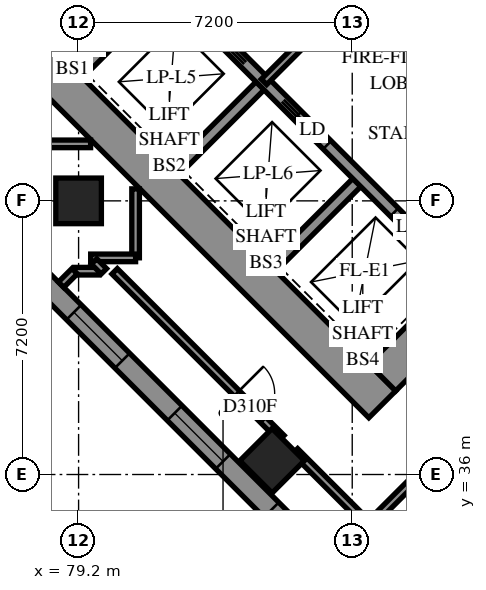
"""IFC4 building model, lengths in metres.
Left out: names, types, materials, properties, quantities, classifications, styles, units other than length and angle.
Written with IfcOpenShell. Run it as: python <this file> out.ifc"""

import sys

from ifc_helpers import new_model, si_unit, direction, frame, frame_2d, origin, origin_2d, place, context, subcontext, project, spatial, polyline, rectangle, outline, extrude, element, fill, save


model = new_model("IFC4")
c1 = context("Model", 3, precision=1e-05, world=origin(), true_north=direction((0.0, 1.0)))
c2 = subcontext(c1, "Body", "Model", "MODEL_VIEW")
j1 = project(units=[si_unit("LENGTHUNIT", "METRE"), si_unit("PLANEANGLEUNIT", "RADIAN")], contexts=[c1])
p1 = place(None, origin())
s1 = spatial("IfcSite", under=j1, at=p1, CompositionType="ELEMENT")
p2 = place(p1, origin())
s2 = spatial("IfcBuilding", under=s1, at=p2, CompositionType="ELEMENT")
p3 = place(p2, frame((0.0, 0.0, 22.8)))
s3 = spatial("IfcBuildingStorey", under=s2, at=p3, CompositionType="ELEMENT", Elevation=22.8)
for number, where, z_axis, x_axis in (
    (1, (79.2, 43.2, 0.0), (0.0, 0.0, 1.0), (1.0, 0.0, 0.0)),
    (2, (84.291, 36.362, 0.0), (0.0, 0.0, 1.0), (0.707, -0.707, 0.0)),
):
    element("IfcColumn", number, at=place(p3, frame(where, z_axis=z_axis, x_axis=x_axis)), inside=s3, PredefinedType="COLUMN", context=c2, shape_type="SweptSolid", body=[
        extrude(rectangle(XDim=1.2, YDim=1.2, at=origin_2d()), origin(), (0.0, 0.0, 1.0), 3.9),
    ])
p4 = place(p3, frame((75.594, 49.443, -0.4), z_axis=(0.0, 0.0, 1.0), x_axis=(0.7071037324, -0.70710983, 0.0)))
e3 = element("IfcWall", 3, at=p4, inside=s3, PredefinedType="SHEAR", context=c2, shape_type="SweptSolid", body=[
    extrude(rectangle(XDim=16.4, YDim=1.0, at=frame_2d((8.2, 0.0))), origin(), (0.0, 0.0, 1.0), 3.6),
])
p5 = place(p3, frame((87.19, 38.554, -0.4), z_axis=(0.0, 0.0, 1.0), x_axis=(0.707103309, 0.7071102534, 0.0)))
e4 = element("IfcWall", 4, at=p5, inside=s3, PredefinedType="SHEAR", context=c2, shape_type="SweptSolid", body=[
    extrude(rectangle(XDim=14.4, YDim=1.0, at=frame_2d((7.2, 0.0))), origin(), (0.0, 0.0, 1.0), 3.6),
])
p6 = place(p5, frame((4.55, 0.0, 0.4)))
e5 = element("IfcOpeningElement", 5, at=p6, cuts=e4, PredefinedType="OPENING", context=c2, shape_type="SweptSolid", body=[
    extrude(rectangle(XDim=1.1, YDim=2.1, at=frame_2d((0.55, 1.05))), frame((0.0, 0.51, 0.0), z_axis=(0.0, -1.0, 0.0), x_axis=(1.0, 0.0, 0.0)), (0.0, 0.0, 1.0), 1.02),
])
p7 = place(p5, frame((11.35, 0.0, 0.4)))
e6 = element("IfcOpeningElement", 6, at=p7, cuts=e4, PredefinedType="OPENING", context=c2, shape_type="SweptSolid", body=[
    extrude(rectangle(XDim=1.1, YDim=2.1, at=frame_2d((0.55, 1.05))), frame((0.0, 0.51, 0.0), z_axis=(0.0, -1.0, 0.0), x_axis=(1.0, 0.0, 0.0)), (0.0, 0.0, 1.0), 1.02),
])
p8 = place(p3, frame((79.2, 46.544, 0.0), z_axis=(0.0, 0.0, 1.0), x_axis=(0.7071219326, 0.7070916295, 0.0)))
e7 = element("IfcWall", 7, at=p8, inside=s3, PredefinedType="SOLIDWALL", context=c2, shape_type="SweptSolid", body=[
    extrude(rectangle(XDim=3.3, YDim=0.3, at=frame_2d((1.65, 0.0))), origin(), (0.0, 0.0, 1.0), 3.9),
])
for number, where, z_axis, x_axis in (
    (8, (81.746, 43.999, 0.0), (0.0, 0.0, 1.0), (0.707, 0.707, 0.0)),
    (9, (84.291, 41.453, 0.0), (0.0, 0.0, 1.0), (0.707, 0.707, 0.0)),
):
    element("IfcWall", number, at=place(p3, frame(where, z_axis=z_axis, x_axis=x_axis)), inside=s3, PredefinedType="SOLIDWALL", context=c2, shape_type="SweptSolid", body=[
        extrude(rectangle(XDim=3.3, YDim=0.3, at=frame_2d((1.65, 0.0))), origin(), (0.0, 0.0, 1.0), 3.9),
    ])
p9 = place(p3, frame((78.988, 51.423, 0.0), z_axis=(0.0, 0.0, 1.0), x_axis=(0.7071067812, -0.7071067812, 0.0)))
e10 = element("IfcWall", 10, at=p9, inside=s3, PredefinedType="SOLIDWALL", context=c2, shape_type="SweptSolid", body=[
    extrude(rectangle(XDim=14.4, YDim=0.3, at=frame_2d((7.2, 0.0))), origin(), (0.0, 0.0, 1.0), 3.9),
])
p10 = place(p9, frame((1.25, 0.0, 0.0)))
e11 = element("IfcOpeningElement", 11, at=p10, cuts=e10, PredefinedType="OPENING", context=c2, shape_type="SweptSolid", body=[
    extrude(rectangle(XDim=1.1, YDim=2.1, at=frame_2d((0.55, 1.05))), frame((0.0, 0.16, 0.0), z_axis=(0.0, -1.0, 0.0), x_axis=(1.0, 0.0, 0.0)), (0.0, 0.0, 1.0), 0.32),
])
p11 = place(p9, frame((4.85, 0.0, 0.0)))
e12 = element("IfcOpeningElement", 12, at=p11, cuts=e10, PredefinedType="OPENING", context=c2, shape_type="SweptSolid", body=[
    extrude(rectangle(XDim=1.1, YDim=2.1, at=frame_2d((0.55, 1.05))), frame((0.0, 0.16, 0.0), z_axis=(0.0, -1.0, 0.0), x_axis=(1.0, 0.0, 0.0)), (0.0, 0.0, 1.0), 0.32),
])
p12 = place(p9, frame((8.45, 0.0, 0.0)))
e13 = element("IfcOpeningElement", 13, at=p12, cuts=e10, PredefinedType="OPENING", context=c2, shape_type="SweptSolid", body=[
    extrude(rectangle(XDim=1.1, YDim=2.1, at=frame_2d((0.55, 1.05))), frame((0.0, 0.16, 0.0), z_axis=(0.0, -1.0, 0.0), x_axis=(1.0, 0.0, 0.0)), (0.0, 0.0, 1.0), 0.32),
])
p13 = place(p9, frame((12.05, 0.0, 0.0)))
e14 = element("IfcOpeningElement", 14, at=p13, cuts=e10, PredefinedType="OPENING", context=c2, shape_type="SweptSolid", body=[
    extrude(rectangle(XDim=1.1, YDim=2.1, at=frame_2d((0.55, 1.05))), frame((0.0, 0.16, 0.0), z_axis=(0.0, -1.0, 0.0), x_axis=(1.0, 0.0, 0.0)), (0.0, 0.0, 1.0), 0.32),
])
p14 = place(p3, frame((81.534, 53.969, 0.0), z_axis=(0.0, 0.0, 1.0), x_axis=(0.707103309, -0.7071102534, 0.0)))
e15 = element("IfcWall", 15, at=p14, inside=s3, PredefinedType="SOLIDWALL", context=c2, shape_type="SweptSolid", body=[
    extrude(rectangle(XDim=14.4, YDim=0.3, at=frame_2d((7.2, 0.0))), origin(), (0.0, 0.0, 1.0), 3.9),
])
p15 = place(p14, frame((12.05, 0.0, 0.0)))
e16 = element("IfcOpeningElement", 16, at=p15, cuts=e15, PredefinedType="OPENING", context=c2, shape_type="SweptSolid", body=[
    extrude(rectangle(XDim=1.1, YDim=2.1, at=frame_2d((0.55, 1.05))), frame((0.0, 0.16, 0.0), z_axis=(0.0, -1.0, 0.0), x_axis=(1.0, 0.0, 0.0)), (0.0, 0.0, 1.0), 0.32),
])
p16 = place(p3, frame((117.843, 34.665, 0.0), z_axis=(0.0, 0.0, 1.0), x_axis=(-0.7071067812, 0.7071067812, 0.0)))
e17 = element("IfcWall", 17, at=p16, inside=s3, PredefinedType="SOLIDWALL", context=c2, shape_type="SweptSolid", body=[
    extrude(outline(polyline([(-0.275, -0.275), (54.222, -0.275), (53.994, 0.275), (0.275, 0.275), (-0.275, -0.275)])), origin(), (0.0, 0.0, 1.0), 3.9),
])
p17 = place(p16, frame((0.8, 0.0, 0.7)))
e18 = element("IfcOpeningElement", 18, at=p17, cuts=e17, PredefinedType="OPENING", context=c2, shape_type="SweptSolid", body=[
    extrude(rectangle(XDim=1.8, YDim=2.4, at=frame_2d((0.9, 1.2))), frame((0.0, 0.285, 0.0), z_axis=(0.0, -1.0, 0.0), x_axis=(1.0, 0.0, 0.0)), (0.0, 0.0, 1.0), 0.57),
])
p18 = place(p16, frame((4.225, 0.0, 0.7)))
e19 = element("IfcOpeningElement", 19, at=p18, cuts=e17, PredefinedType="OPENING", context=c2, shape_type="SweptSolid", body=[
    extrude(rectangle(XDim=1.8, YDim=2.4, at=frame_2d((0.9, 1.2))), frame((0.0, 0.285, 0.0), z_axis=(0.0, -1.0, 0.0), x_axis=(1.0, 0.0, 0.0)), (0.0, 0.0, 1.0), 0.57),
])
p19 = place(p16, frame((7.825, 0.0, 0.7)))
e20 = element("IfcOpeningElement", 20, at=p19, cuts=e17, PredefinedType="OPENING", context=c2, shape_type="SweptSolid", body=[
    extrude(rectangle(XDim=1.8, YDim=2.4, at=frame_2d((0.9, 1.2))), frame((0.0, 0.285, 0.0), z_axis=(0.0, -1.0, 0.0), x_axis=(1.0, 0.0, 0.0)), (0.0, 0.0, 1.0), 0.57),
])
p20 = place(p16, frame((11.425, 0.0, 0.7)))
e21 = element("IfcOpeningElement", 21, at=p20, cuts=e17, PredefinedType="OPENING", context=c2, shape_type="SweptSolid", body=[
    extrude(rectangle(XDim=1.8, YDim=2.4, at=frame_2d((0.9, 1.2))), frame((0.0, 0.285, 0.0), z_axis=(0.0, -1.0, 0.0), x_axis=(1.0, 0.0, 0.0)), (0.0, 0.0, 1.0), 0.57),
])
p21 = place(p16, frame((15.025, 0.0, 0.7)))
e22 = element("IfcOpeningElement", 22, at=p21, cuts=e17, PredefinedType="OPENING", context=c2, shape_type="SweptSolid", body=[
    extrude(rectangle(XDim=1.8, YDim=2.4, at=frame_2d((0.9, 1.2))), frame((0.0, 0.285, 0.0), z_axis=(0.0, -1.0, 0.0), x_axis=(1.0, 0.0, 0.0)), (0.0, 0.0, 1.0), 0.57),
])
p22 = place(p16, frame((18.625, 0.0, 0.7)))
e23 = element("IfcOpeningElement", 23, at=p22, cuts=e17, PredefinedType="OPENING", context=c2, shape_type="SweptSolid", body=[
    extrude(rectangle(XDim=1.8, YDim=2.4, at=frame_2d((0.9, 1.2))), frame((0.0, 0.285, 0.0), z_axis=(0.0, -1.0, 0.0), x_axis=(1.0, 0.0, 0.0)), (0.0, 0.0, 1.0), 0.57),
])
p23 = place(p16, frame((22.225, 0.0, 0.7)))
e24 = element("IfcOpeningElement", 24, at=p23, cuts=e17, PredefinedType="OPENING", context=c2, shape_type="SweptSolid", body=[
    extrude(rectangle(XDim=1.8, YDim=2.4, at=frame_2d((0.9, 1.2))), frame((0.0, 0.285, 0.0), z_axis=(0.0, -1.0, 0.0), x_axis=(1.0, 0.0, 0.0)), (0.0, 0.0, 1.0), 0.57),
])
p24 = place(p16, frame((25.825, 0.0, 0.7)))
e25 = element("IfcOpeningElement", 25, at=p24, cuts=e17, PredefinedType="OPENING", context=c2, shape_type="SweptSolid", body=[
    extrude(rectangle(XDim=1.8, YDim=2.4, at=frame_2d((0.9, 1.2))), frame((0.0, 0.285, 0.0), z_axis=(0.0, -1.0, 0.0), x_axis=(1.0, 0.0, 0.0)), (0.0, 0.0, 1.0), 0.57),
])
p25 = place(p16, frame((29.425, 0.0, 0.7)))
e26 = element("IfcOpeningElement", 26, at=p25, cuts=e17, PredefinedType="OPENING", context=c2, shape_type="SweptSolid", body=[
    extrude(rectangle(XDim=1.8, YDim=2.4, at=frame_2d((0.9, 1.2))), frame((0.0, 0.285, 0.0), z_axis=(0.0, -1.0, 0.0), x_axis=(1.0, 0.0, 0.0)), (0.0, 0.0, 1.0), 0.57),
])
p26 = place(p16, frame((33.025, 0.0, 0.7)))
e27 = element("IfcOpeningElement", 27, at=p26, cuts=e17, PredefinedType="OPENING", context=c2, shape_type="SweptSolid", body=[
    extrude(rectangle(XDim=1.8, YDim=2.4, at=frame_2d((0.9, 1.2))), frame((0.0, 0.285, 0.0), z_axis=(0.0, -1.0, 0.0), x_axis=(1.0, 0.0, 0.0)), (0.0, 0.0, 1.0), 0.57),
])
p27 = place(p16, frame((36.625, 0.0, 0.7)))
e28 = element("IfcOpeningElement", 28, at=p27, cuts=e17, PredefinedType="OPENING", context=c2, shape_type="SweptSolid", body=[
    extrude(rectangle(XDim=1.8, YDim=2.4, at=frame_2d((0.9, 1.2))), frame((0.0, 0.285, 0.0), z_axis=(0.0, -1.0, 0.0), x_axis=(1.0, 0.0, 0.0)), (0.0, 0.0, 1.0), 0.57),
])
p28 = place(p16, frame((40.225, 0.0, 0.7)))
e29 = element("IfcOpeningElement", 29, at=p28, cuts=e17, PredefinedType="OPENING", context=c2, shape_type="SweptSolid", body=[
    extrude(rectangle(XDim=1.8, YDim=2.4, at=frame_2d((0.9, 1.2))), frame((0.0, 0.285, 0.0), z_axis=(0.0, -1.0, 0.0), x_axis=(1.0, 0.0, 0.0)), (0.0, 0.0, 1.0), 0.57),
])
p29 = place(p16, frame((43.825, 0.0, 0.7)))
e30 = element("IfcOpeningElement", 30, at=p29, cuts=e17, PredefinedType="OPENING", context=c2, shape_type="SweptSolid", body=[
    extrude(rectangle(XDim=1.8, YDim=2.4, at=frame_2d((0.9, 1.2))), frame((0.0, 0.285, 0.0), z_axis=(0.0, -1.0, 0.0), x_axis=(1.0, 0.0, 0.0)), (0.0, 0.0, 1.0), 0.57),
])
p30 = place(p16, frame((47.425, 0.0, 0.7)))
e31 = element("IfcOpeningElement", 31, at=p30, cuts=e17, PredefinedType="OPENING", context=c2, shape_type="SweptSolid", body=[
    extrude(rectangle(XDim=1.8, YDim=2.4, at=frame_2d((0.9, 1.2))), frame((0.0, 0.285, 0.0), z_axis=(0.0, -1.0, 0.0), x_axis=(1.0, 0.0, 0.0)), (0.0, 0.0, 1.0), 0.57),
])
p31 = place(p16, frame((51.06, 0.0, 0.7)))
e32 = element("IfcOpeningElement", 32, at=p31, cuts=e17, PredefinedType="OPENING", context=c2, shape_type="SweptSolid", body=[
    extrude(rectangle(XDim=1.8, YDim=2.4, at=frame_2d((0.9, 1.2))), frame((0.0, 0.285, 0.0), z_axis=(0.0, -1.0, 0.0), x_axis=(1.0, 0.0, 0.0)), (0.0, 0.0, 1.0), 0.57),
])
p32 = place(p3, frame((77.07, 42.275, 0.0), z_axis=(0.0, 0.0, 1.0), x_axis=(0.7071067812, -0.7071067812, 0.0)))
e33 = element("IfcWall", 33, at=p32, inside=s3, PredefinedType="SOLIDWALL", context=c2, shape_type="SweptSolid", body=[
    extrude(outline(polyline([(0.114, -0.275), (39.288, -0.275), (38.737, 0.275), (-0.114, 0.275), (0.114, -0.275)])), origin(), (0.0, 0.0, 1.0), 3.9),
])
p33 = place(p32, frame((2.837, 0.0, 0.7)))
e34 = element("IfcOpeningElement", 34, at=p33, cuts=e33, PredefinedType="OPENING", context=c2, shape_type="SweptSolid", body=[
    extrude(rectangle(XDim=1.8, YDim=2.4, at=frame_2d((0.9, 1.2))), frame((0.0, 0.285, 0.0), z_axis=(0.0, -1.0, 0.0), x_axis=(1.0, 0.0, 0.0)), (0.0, 0.0, 1.0), 0.57),
])
p34 = place(p32, frame((6.588, 0.0, 0.7)))
e35 = element("IfcOpeningElement", 35, at=p34, cuts=e33, PredefinedType="OPENING", context=c2, shape_type="SweptSolid", body=[
    extrude(rectangle(XDim=1.8, YDim=2.4, at=frame_2d((0.9, 1.2))), frame((0.0, 0.285, 0.0), z_axis=(0.0, -1.0, 0.0), x_axis=(1.0, 0.0, 0.0)), (0.0, 0.0, 1.0), 0.57),
])
p35 = place(p32, frame((10.188, 0.0, 0.7)))
e36 = element("IfcOpeningElement", 36, at=p35, cuts=e33, PredefinedType="OPENING", context=c2, shape_type="SweptSolid", body=[
    extrude(rectangle(XDim=1.8, YDim=2.4, at=frame_2d((0.9, 1.2))), frame((0.0, 0.285, 0.0), z_axis=(0.0, -1.0, 0.0), x_axis=(1.0, 0.0, 0.0)), (0.0, 0.0, 1.0), 0.57),
])
p36 = place(p32, frame((13.787, 0.0, 0.7)))
e37 = element("IfcOpeningElement", 37, at=p36, cuts=e33, PredefinedType="OPENING", context=c2, shape_type="SweptSolid", body=[
    extrude(rectangle(XDim=1.8, YDim=2.4, at=frame_2d((0.9, 1.2))), frame((0.0, 0.285, 0.0), z_axis=(0.0, -1.0, 0.0), x_axis=(1.0, 0.0, 0.0)), (0.0, 0.0, 1.0), 0.57),
])
p37 = place(p32, frame((17.387, 0.0, 0.7)))
e38 = element("IfcOpeningElement", 38, at=p37, cuts=e33, PredefinedType="OPENING", context=c2, shape_type="SweptSolid", body=[
    extrude(rectangle(XDim=1.8, YDim=2.4, at=frame_2d((0.9, 1.2))), frame((0.0, 0.285, 0.0), z_axis=(0.0, -1.0, 0.0), x_axis=(1.0, 0.0, 0.0)), (0.0, 0.0, 1.0), 0.57),
])
p38 = place(p32, frame((20.988, 0.0, 0.7)))
e39 = element("IfcOpeningElement", 39, at=p38, cuts=e33, PredefinedType="OPENING", context=c2, shape_type="SweptSolid", body=[
    extrude(rectangle(XDim=1.8, YDim=2.4, at=frame_2d((0.9, 1.2))), frame((0.0, 0.285, 0.0), z_axis=(0.0, -1.0, 0.0), x_axis=(1.0, 0.0, 0.0)), (0.0, 0.0, 1.0), 0.57),
])
p39 = place(p32, frame((24.587, 0.0, 0.7)))
e40 = element("IfcOpeningElement", 40, at=p39, cuts=e33, PredefinedType="OPENING", context=c2, shape_type="SweptSolid", body=[
    extrude(rectangle(XDim=1.8, YDim=2.4, at=frame_2d((0.9, 1.2))), frame((0.0, 0.285, 0.0), z_axis=(0.0, -1.0, 0.0), x_axis=(1.0, 0.0, 0.0)), (0.0, 0.0, 1.0), 0.57),
])
p40 = place(p32, frame((28.188, 0.0, 0.7)))
e41 = element("IfcOpeningElement", 41, at=p40, cuts=e33, PredefinedType="OPENING", context=c2, shape_type="SweptSolid", body=[
    extrude(rectangle(XDim=1.8, YDim=2.4, at=frame_2d((0.9, 1.2))), frame((0.0, 0.285, 0.0), z_axis=(0.0, -1.0, 0.0), x_axis=(1.0, 0.0, 0.0)), (0.0, 0.0, 1.0), 0.57),
])
p41 = place(p32, frame((31.788, 0.0, 0.7)))
e42 = element("IfcOpeningElement", 42, at=p41, cuts=e33, PredefinedType="OPENING", context=c2, shape_type="SweptSolid", body=[
    extrude(rectangle(XDim=1.8, YDim=2.4, at=frame_2d((0.9, 1.2))), frame((0.0, 0.285, 0.0), z_axis=(0.0, -1.0, 0.0), x_axis=(1.0, 0.0, 0.0)), (0.0, 0.0, 1.0), 0.57),
])
p42 = place(p32, frame((35.388, 0.0, 0.7)))
e43 = element("IfcOpeningElement", 43, at=p42, cuts=e33, PredefinedType="OPENING", context=c2, shape_type="SweptSolid", body=[
    extrude(rectangle(XDim=1.8, YDim=2.4, at=frame_2d((0.9, 1.2))), frame((0.0, 0.285, 0.0), z_axis=(0.0, -1.0, 0.0), x_axis=(1.0, 0.0, 0.0)), (0.0, 0.0, 1.0), 0.57),
])
p43 = place(p3, frame((84.079, 46.332, 0.0), z_axis=(0.0, 0.0, 1.0), x_axis=(0.7071067812, 0.7071067812, 0.0)))
e44 = element("IfcWall", 44, at=p43, inside=s3, PredefinedType="PARTITIONING", context=c2, shape_type="SweptSolid", body=[
    extrude(rectangle(XDim=3.6, YDim=0.2, at=frame_2d((1.8, 0.0))), origin(), (0.0, 0.0, 1.0), 3.9),
])
p44 = place(p3, frame((86.375, 33.358, 0.0), z_axis=(0.0, 0.0, 1.0), x_axis=(0.707006294, 0.7072072541, 0.0)))
e45 = element("IfcWall", 45, at=p44, inside=s3, PredefinedType="PARTITIONING", context=c2, shape_type="SweptSolid", body=[
    extrude(rectangle(XDim=10.45, YDim=0.2, at=frame_2d((5.225, 0.0))), origin(), (0.0, 0.0, 1.0), 3.9),
])
p45 = place(p3, frame((86.837, 34.667, 0.0), z_axis=(0.0, 0.0, 1.0), x_axis=(0.7071067812, 0.7071067812, 0.0)))
e46 = element("IfcWall", 46, at=p45, inside=s3, PredefinedType="PARTITIONING", context=c2, shape_type="SweptSolid", body=[
    extrude(rectangle(XDim=9.198, YDim=0.2, at=frame_2d((4.599, 0.0))), origin(), (0.0, 0.0, 1.0), 3.9),
])
p46 = place(p3, frame((80.148, 41.346, 0.0), z_axis=(0.0, 0.0, 1.0), x_axis=(0.7071067812, -0.7071067812, 0.0)))
e47 = element("IfcWall", 47, at=p46, inside=s3, PredefinedType="PARTITIONING", context=c2, shape_type="SweptSolid", body=[
    extrude(rectangle(XDim=6.206, YDim=0.2, at=frame_2d((3.103, 0.0))), origin(), (0.0, 0.0, 1.0), 3.9),
])
p47 = place(p46, frame((4.541, 0.0, 0.0)))
e48 = element("IfcOpeningElement", 48, at=p47, cuts=e47, PredefinedType="OPENING", context=c2, shape_type="SweptSolid", body=[
    extrude(rectangle(XDim=1.0, YDim=2.1, at=frame_2d((0.5, 1.05))), frame((0.0, 0.11, 0.0), z_axis=(0.0, -1.0, 0.0), x_axis=(1.0, 0.0, 0.0)), (0.0, 0.0, 1.0), 0.22),
])
p48 = place(p3, frame((86.837, 34.667, 0.0), z_axis=(0.0, 0.0, 1.0), x_axis=(-0.7071795251, 0.7070340298, 0.0)))
e49 = element("IfcWall", 49, at=p48, inside=s3, PredefinedType="PARTITIONING", context=c2, shape_type="SweptSolid", body=[
    extrude(rectangle(XDim=2.749, YDim=0.2, at=frame_2d((1.375, 0.0))), origin(), (0.0, 0.0, 1.0), 3.9),
])
for number, where, z_axis, x_axis in (
    (50, (77.702, 44.7, 0.0), (0.0, 0.0, 1.0), (1.0, 0.0, 0.0)),
    (51, (80.7, 41.702, 0.0), (0.0, 0.0, 1.0), (0.0, 1.0, 0.0)),
):
    element("IfcWall", number, at=place(p3, frame(where, z_axis=z_axis, x_axis=x_axis)), inside=s3, PredefinedType="PARTITIONING", context=c2, shape_type="SweptSolid", body=[
        extrude(rectangle(XDim=1.814, YDim=0.2, at=frame_2d((0.907, 0.0))), origin(), (0.0, 0.0, 1.0), 3.9),
    ])
p49 = place(p3, frame((79.518, 41.7, 0.0), z_axis=(0.0, 0.0, 1.0), x_axis=(1.0, 0.0, 0.0)))
e52 = element("IfcWall", 52, at=p49, inside=s3, PredefinedType="PARTITIONING", context=c2, shape_type="SweptSolid", body=[
    extrude(rectangle(XDim=1.182, YDim=0.2, at=frame_2d((0.591, 0.0))), origin(), (0.0, 0.0, 1.0), 3.9),
])
p50 = place(p3, frame((79.098, 41.35, 0.0), z_axis=(0.0, 0.0, 1.0), x_axis=(1.0, 0.0, 0.0)))
e53 = element("IfcWall", 53, at=p50, inside=s3, PredefinedType="PARTITIONING", context=c2, shape_type="SweptSolid", body=[
    extrude(rectangle(XDim=0.63, YDim=0.2, at=frame_2d((0.315, 0.0))), origin(), (0.0, 0.0, 1.0), 3.9),
])
p51 = place(p3, frame((79.607, 41.605, 0.0), z_axis=(0.0, 0.0, 1.0), x_axis=(0.7071067812, -0.7071067812, 0.0)))
e54 = element("IfcWall", 54, at=p51, inside=s3, PredefinedType="PARTITIONING", context=c2, shape_type="SweptSolid", body=[
    extrude(rectangle(XDim=0.365, YDim=0.2, at=frame_2d((0.182, 0.0))), origin(), (0.0, 0.0, 1.0), 3.9),
])
p52 = place(p3, frame((78.74, 40.994, 0.0), z_axis=(0.0, 0.0, 1.0), x_axis=(0.7072060451, 0.7070075033, 0.0)))
e55 = element("IfcWall", 55, at=p52, inside=s3, PredefinedType="PARTITIONING", context=c2, shape_type="SweptSolid", body=[
    extrude(rectangle(XDim=0.504, YDim=0.2, at=frame_2d((0.252, 0.0))), origin(), (0.0, 0.0, 1.0), 3.9),
])
p53 = place(p33, origin())
e56 = element("IfcWindow", 56, at=p53, inside=s3, PartitioningType="SINGLE_PANEL", PredefinedType="WINDOW", context=c2, shape_type="SweptSolid", body=[
    extrude(rectangle(XDim=1.8, YDim=2.4, at=frame_2d((0.9, 1.2))), frame((0.0, 0.155, 0.0), z_axis=(0.0, -1.0, 0.0), x_axis=(1.0, 0.0, 0.0)), (0.0, 0.0, 1.0), 0.06),
])
fill(e34, e56)
p54 = place(p34, origin())
e57 = element("IfcWindow", 57, at=p54, inside=s3, PartitioningType="SINGLE_PANEL", PredefinedType="WINDOW", context=c2, shape_type="SweptSolid", body=[
    extrude(rectangle(XDim=1.8, YDim=2.4, at=frame_2d((0.9, 1.2))), frame((0.0, 0.155, 0.0), z_axis=(0.0, -1.0, 0.0), x_axis=(1.0, 0.0, 0.0)), (0.0, 0.0, 1.0), 0.06),
])
fill(e35, e57)
p55 = place(p35, origin())
e58 = element("IfcWindow", 58, at=p55, inside=s3, PartitioningType="SINGLE_PANEL", PredefinedType="WINDOW", context=c2, shape_type="SweptSolid", body=[
    extrude(rectangle(XDim=1.8, YDim=2.4, at=frame_2d((0.9, 1.2))), frame((0.0, 0.155, 0.0), z_axis=(0.0, -1.0, 0.0), x_axis=(1.0, 0.0, 0.0)), (0.0, 0.0, 1.0), 0.06),
])
fill(e36, e58)
p56 = place(p12, origin())
e59 = element("IfcDoor", 59, at=p56, inside=s3, OperationType="SLIDING_TO_LEFT", PredefinedType="DOOR", context=c2, shape_type="SweptSolid", body=[
    extrude(rectangle(XDim=1.1, YDim=2.1, at=frame_2d((0.55, 1.05))), frame((0.0, 0.025, 0.0), z_axis=(0.0, -1.0, 0.0), x_axis=(1.0, 0.0, 0.0)), (0.0, 0.0, 1.0), 0.05),
])
fill(e13, e59)
p57 = place(p13, origin())
e60 = element("IfcDoor", 60, at=p57, inside=s3, OperationType="SLIDING_TO_RIGHT", PredefinedType="DOOR", context=c2, shape_type="SweptSolid", body=[
    extrude(rectangle(XDim=1.1, YDim=2.1, at=frame_2d((0.55, 1.05))), frame((0.0, 0.025, 0.0), z_axis=(0.0, -1.0, 0.0), x_axis=(1.0, 0.0, 0.0)), (0.0, 0.0, 1.0), 0.05),
])
fill(e14, e60)
p58 = place(p47, origin())
e61 = element("IfcDoor", 61, at=p58, inside=s3, OperationType="SINGLE_SWING_RIGHT", PredefinedType="DOOR", context=c2, shape_type="SweptSolid", body=[
    extrude(rectangle(XDim=1.0, YDim=2.1, at=frame_2d((0.5, 1.05))), frame((0.0, 0.025, 0.0), z_axis=(0.0, -1.0, 0.0), x_axis=(1.0, 0.0, 0.0)), (0.0, 0.0, 1.0), 0.05),
])
fill(e48, e61)
save(model, sys.argv[1])
